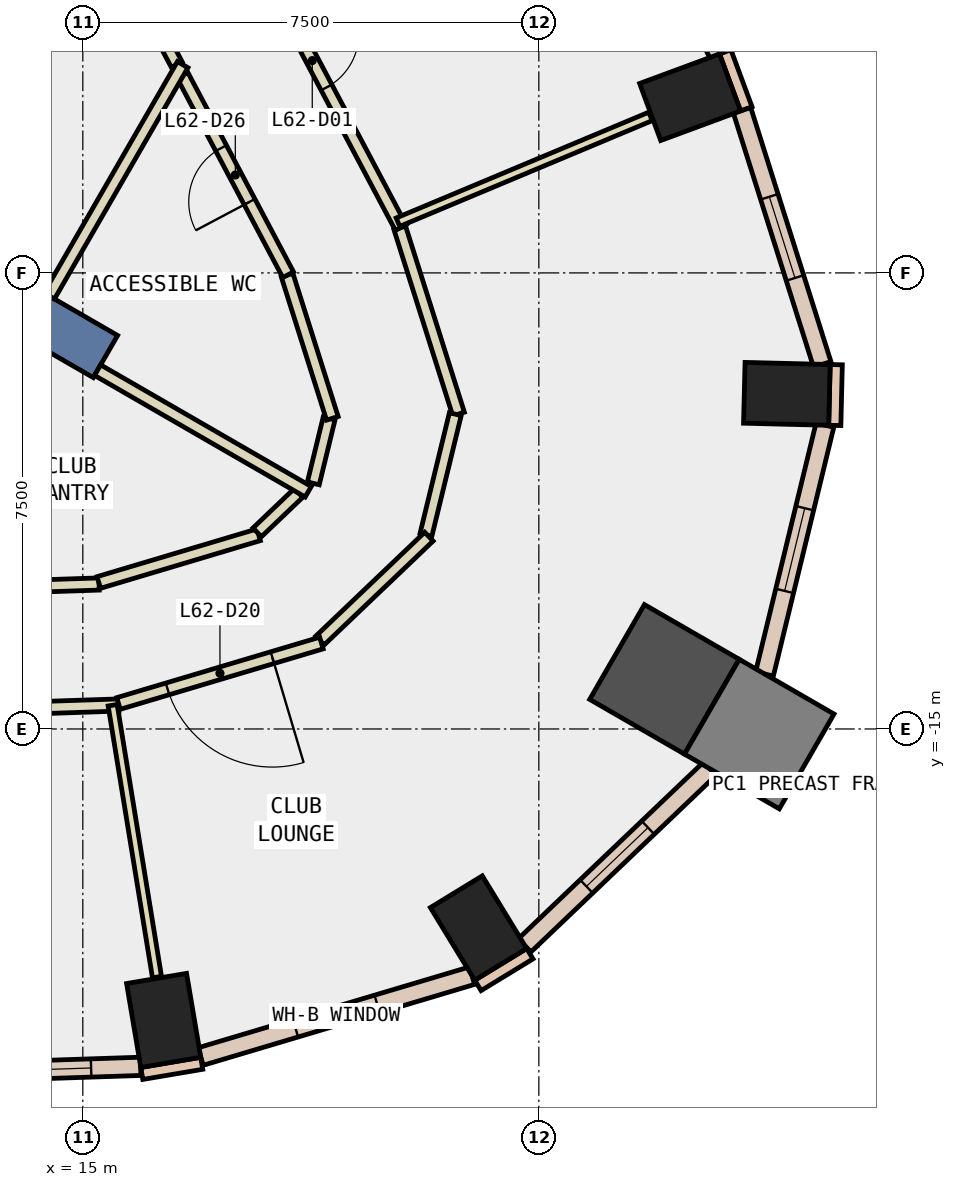
"""IFC4 building model, lengths in metres.
Left out: names, types, materials, properties, quantities, classifications, styles, units other than length and angle.
Written with IfcOpenShell. Run it as: python <this file> out.ifc"""

import sys

from ifc_helpers import new_model, si_unit, direction, frame, frame_2d, origin, origin_2d, place, context, subcontext, project, spatial, rectangle, extrude, element, fill, save


model = new_model("IFC4")
c1 = context("Model", 3, precision=1e-05, world=origin(), true_north=direction((0.0, 1.0)))
c2 = subcontext(c1, "Body", "Model", "MODEL_VIEW")
j1 = project(units=[si_unit("LENGTHUNIT", "METRE"), si_unit("PLANEANGLEUNIT", "RADIAN")], contexts=[c1])
p1 = place(None, origin())
s1 = spatial("IfcSite", under=j1, at=p1, CompositionType="ELEMENT")
p2 = place(p1, origin())
s2 = spatial("IfcBuilding", under=s1, at=p2, CompositionType="ELEMENT")
p3 = place(p2, frame((0.0, 0.0, 270.2)))
s3 = spatial("IfcBuildingStorey", under=s2, at=p3, CompositionType="ELEMENT", Elevation=270.2)
for number, where, z_axis, x_axis in (
    (1, (16.33, -19.793, -0.34), (0.0, 0.0, 1.0), (0.986, 0.167, 0.0)),
    (2, (21.508, -18.274, -0.34), (0.0, 0.0, 1.0), (0.853, 0.521, 0.0)),
):
    element("IfcColumn", number, at=place(p3, frame(where, z_axis=z_axis, x_axis=x_axis)), inside=s3, PredefinedType="COLUMN", context=c2, shape_type="SweptSolid", body=[
        extrude(rectangle(XDim=1.0, YDim=1.4, at=origin_2d()), origin(), (0.0, 0.0, 1.0), 3.6),
    ])
p4 = place(p3, frame((24.566, -14.184, -0.34), z_axis=(0.0, 0.0, 1.0), x_axis=(-0.866025403784, 0.5, 0.0)))
e3 = element("IfcColumn", 3, at=p4, inside=s3, PredefinedType="COLUMN", context=c2, shape_type="SweptSolid", body=[
    extrude(rectangle(XDim=1.8, YDim=1.8, at=origin_2d()), origin(), (0.0, 0.0, 1.0), 3.6),
])
for number, where, z_axis, x_axis in (
    (4, (26.579, -9.489, -0.34), (0.0, 0.0, 1.0), (0.025, 1.0, 0.0)),
    (5, (24.988, -4.611, -0.34), (0.0, 0.0, 1.0), (-0.347, 0.938, 0.0)),
):
    element("IfcColumn", number, at=place(p3, frame(where, z_axis=z_axis, x_axis=x_axis)), inside=s3, PredefinedType="COLUMN", context=c2, shape_type="SweptSolid", body=[
        extrude(rectangle(XDim=1.0, YDim=1.4, at=origin_2d()), origin(), (0.0, 0.0, 1.0), 3.6),
    ])
p5 = place(p3, frame((26.125, -15.084, -0.34), z_axis=(0.0, 0.0, 1.0), x_axis=(-0.866025403784, 0.5, 0.0)))
e6 = element("IfcColumn", 6, at=p5, inside=s3, PredefinedType="COLUMN", context=c2, shape_type="SweptSolid", body=[
    extrude(rectangle(XDim=1.8, YDim=1.8, at=origin_2d()), origin(), (0.0, 0.0, 1.0), 3.6),
])
p6 = place(p3, frame((7.578, -4.375, -0.34), z_axis=(0.0, 0.0, 1.0), x_axis=(0.866024315419, -0.5000018851, 0.0)))
e7 = element("IfcWall", 7, at=p6, inside=s3, PredefinedType="SHEAR", context=c2, shape_type="SweptSolid", body=[
    extrude(rectangle(XDim=9.0, YDim=0.8, at=frame_2d((4.5, 0.0))), origin(), (0.0, 0.0, 1.0), 3.6),
])
for number, where, z_axis, x_axis in (
    (8, (25.912, -4.803, 0.0), (0.0, 0.0, 1.0), (-0.347, 0.938, 0.0)),
    (9, (15.97, -20.665, 0.0), (0.0, 0.0, 1.0), (0.986, 0.167, 0.0)),
):
    element("IfcWall", number, at=place(p3, frame(where, z_axis=z_axis, x_axis=x_axis)), inside=s3, PredefinedType="STANDARD", context=c2, shape_type="SweptSolid", body=[
        extrude(rectangle(XDim=1.0, YDim=0.2, at=frame_2d((0.5, 0.0))), origin(), (0.0, 0.0, 1.0), 3.26),
    ])
p7 = place(p3, frame((21.498, -19.217, 0.0), z_axis=(0.0, 0.0, 1.0), x_axis=(0.853679739553, 0.520798331677, 0.0)))
e10 = element("IfcWall", 10, at=p7, inside=s3, PredefinedType="STANDARD", context=c2, shape_type="SweptSolid", body=[
    extrude(rectangle(XDim=1.0, YDim=0.2, at=frame_2d((0.5, 0.0))), origin(), (0.0, 0.0, 1.0), 3.26),
])
p8 = place(p3, frame((27.367, -10.008, 0.0), z_axis=(0.0, 0.0, 1.0), x_axis=(0.024186470916, 0.999707464524, 0.0)))
e11 = element("IfcWall", 11, at=p8, inside=s3, PredefinedType="STANDARD", context=c2, shape_type="SweptSolid", body=[
    extrude(rectangle(XDim=0.999, YDim=0.2, at=frame_2d((0.5, 0.0))), origin(), (0.0, 0.0, 1.0), 3.26),
])
p9 = place(p3, frame((8.296, -20.802, 0.0), z_axis=(0.0, 0.0, 1.0), x_axis=(0.999450376985, 0.033150323459, 0.0)))
e12 = element("IfcWall", 12, at=p9, inside=s3, PredefinedType="STANDARD", context=c2, shape_type="SweptSolid", body=[
    extrude(rectangle(XDim=7.659, YDim=0.3, at=frame_2d((3.83, 0.0))), origin(), (0.0, 0.0, 1.0), 3.26),
])
p10 = place(p9, frame((0.815, 0.0, 0.9)))
e13 = element("IfcOpeningElement", 13, at=p10, cuts=e12, PredefinedType="OPENING", context=c2, shape_type="SweptSolid", body=[
    extrude(rectangle(XDim=2.2, YDim=2.0, at=frame_2d((1.1, 1.0))), frame((0.0, 0.16, 0.0), z_axis=(0.0, -1.0, 0.0), x_axis=(1.0, 0.0, 0.0)), (0.0, 0.0, 1.0), 0.32),
])
p11 = place(p9, frame((4.644, 0.0, 0.9)))
e14 = element("IfcOpeningElement", 14, at=p11, cuts=e12, PredefinedType="OPENING", context=c2, shape_type="SweptSolid", body=[
    extrude(rectangle(XDim=2.2, YDim=2.0, at=frame_2d((1.1, 1.0))), frame((0.0, 0.16, 0.0), z_axis=(0.0, -1.0, 0.0), x_axis=(1.0, 0.0, 0.0)), (0.0, 0.0, 1.0), 0.32),
])
p12 = place(p3, frame((16.937, -20.387, 0.0), z_axis=(0.0, 0.0, 1.0), x_axis=(0.958361270465, 0.285558532131, 0.0)))
e15 = element("IfcWall", 15, at=p12, inside=s3, PredefinedType="STANDARD", context=c2, shape_type="SweptSolid", body=[
    extrude(rectangle(XDim=4.658, YDim=0.3, at=frame_2d((2.329, 0.0))), origin(), (0.0, 0.0, 1.0), 3.26),
])
p13 = place(p12, frame((1.629, 0.0, 0.9)))
e16 = element("IfcOpeningElement", 16, at=p13, cuts=e15, PredefinedType="OPENING", context=c2, shape_type="SweptSolid", body=[
    extrude(rectangle(XDim=1.4, YDim=2.0, at=frame_2d((0.7, 1.0))), frame((0.0, 0.16, 0.0), z_axis=(0.0, -1.0, 0.0), x_axis=(1.0, 0.0, 0.0)), (0.0, 0.0, 1.0), 0.32),
])
p14 = place(p3, frame((22.266, -18.559, 0.0), z_axis=(0.0, 0.0, 1.0), x_axis=(0.723526681061, 0.690296415892, 0.0)))
e17 = element("IfcWall", 17, at=p14, inside=s3, PredefinedType="STANDARD", context=c2, shape_type="SweptSolid", body=[
    extrude(rectangle(XDim=4.21, YDim=0.3, at=frame_2d((2.105, 0.0))), origin(), (0.0, 0.0, 1.0), 3.26),
])
p15 = place(p14, frame((1.405, 0.0, 0.9)))
e18 = element("IfcOpeningElement", 18, at=p15, cuts=e17, PredefinedType="OPENING", context=c2, shape_type="SweptSolid", body=[
    extrude(rectangle(XDim=1.4, YDim=2.0, at=frame_2d((0.7, 1.0))), frame((0.0, 0.16, 0.0), z_axis=(0.0, -1.0, 0.0), x_axis=(1.0, 0.0, 0.0)), (0.0, 0.0, 1.0), 0.32),
])
p16 = place(p3, frame((26.211, -14.095, 0.0), z_axis=(0.0, 0.0, 1.0), x_axis=(0.236077883519, 0.97173413695, 0.0)))
e19 = element("IfcWall", 19, at=p16, inside=s3, PredefinedType="STANDARD", context=c2, shape_type="SweptSolid", body=[
    extrude(rectangle(XDim=4.211, YDim=0.3, at=frame_2d((2.105, 0.0))), origin(), (0.0, 0.0, 1.0), 3.26),
])
p17 = place(p16, frame((1.405, 0.0, 0.9)))
e20 = element("IfcOpeningElement", 20, at=p17, cuts=e19, PredefinedType="OPENING", context=c2, shape_type="SweptSolid", body=[
    extrude(rectangle(XDim=1.4, YDim=2.0, at=frame_2d((0.7, 1.0))), frame((0.0, 0.16, 0.0), z_axis=(0.0, -1.0, 0.0), x_axis=(1.0, 0.0, 0.0)), (0.0, 0.0, 1.0), 0.32),
])
p18 = place(p3, frame((27.161, -9.004, 0.0), z_axis=(0.0, 0.0, 1.0), x_axis=(-0.30108868778, 0.953596142028, 0.0)))
e21 = element("IfcWall", 21, at=p18, inside=s3, PredefinedType="STANDARD", context=c2, shape_type="SweptSolid", body=[
    extrude(rectangle(XDim=4.38, YDim=0.3, at=frame_2d((2.19, 0.0))), origin(), (0.0, 0.0, 1.0), 3.26),
])
p19 = place(p18, frame((1.49, 0.0, 0.9)))
e22 = element("IfcOpeningElement", 22, at=p19, cuts=e21, PredefinedType="OPENING", context=c2, shape_type="SweptSolid", body=[
    extrude(rectangle(XDim=1.4, YDim=2.0, at=frame_2d((0.7, 1.0))), frame((0.0, 0.16, 0.0), z_axis=(0.0, -1.0, 0.0), x_axis=(1.0, 0.0, 0.0)), (0.0, 0.0, 1.0), 0.32),
])
p20 = place(p3, frame((25.454, -3.907, 0.0), z_axis=(0.0, 0.0, 1.0), x_axis=(-0.468220106253, 0.883611867338, 0.0)))
e23 = element("IfcWall", 23, at=p20, inside=s3, PredefinedType="STANDARD", context=c2, shape_type="SweptSolid", body=[
    extrude(rectangle(XDim=5.703, YDim=0.3, at=frame_2d((2.852, 0.0))), origin(), (0.0, 0.0, 1.0), 3.26),
])
p21 = place(p20, frame((0.476, 0.0, 0.9)))
e24 = element("IfcOpeningElement", 24, at=p21, cuts=e23, PredefinedType="OPENING", context=c2, shape_type="SweptSolid", body=[
    extrude(rectangle(XDim=1.9, YDim=2.0, at=frame_2d((0.95, 1.0))), frame((0.0, 0.16, 0.0), z_axis=(0.0, -1.0, 0.0), x_axis=(1.0, 0.0, 0.0)), (0.0, 0.0, 1.0), 0.32),
])
p22 = place(p20, frame((3.327, 0.0, 0.9)))
e25 = element("IfcOpeningElement", 25, at=p22, cuts=e23, PredefinedType="OPENING", context=c2, shape_type="SweptSolid", body=[
    extrude(rectangle(XDim=1.9, YDim=2.0, at=frame_2d((0.95, 1.0))), frame((0.0, 0.16, 0.0), z_axis=(0.0, -1.0, 0.0), x_axis=(1.0, 0.0, 0.0)), (0.0, 0.0, 1.0), 0.32),
])
p23 = place(p3, frame((16.545, -4.074, 0.0), z_axis=(0.0, 0.0, 1.0), x_axis=(-0.468321873419, 0.883557934081, 0.0)))
e26 = element("IfcWall", 26, at=p23, inside=s3, PredefinedType="PARTITIONING", context=c2, shape_type="SweptSolid", body=[
    extrude(rectangle(XDim=2.093, YDim=0.2, at=frame_2d((1.046, 0.0))), origin(), (0.0, 0.0, 1.0), 3.26),
])
p24 = place(p3, frame((11.716, -12.734, 0.0), z_axis=(0.0, 0.0, 1.0), x_axis=(0.999449093602, 0.03318899362, 0.0)))
e27 = element("IfcWall", 27, at=p24, inside=s3, PredefinedType="PARTITIONING", context=c2, shape_type="SweptSolid", body=[
    extrude(rectangle(XDim=3.553, YDim=0.2, at=frame_2d((1.776, 0.0))), origin(), (0.0, 0.0, 1.0), 3.26),
])
p25 = place(p24, frame((1.276, 0.0, 0.0)))
e28 = element("IfcOpeningElement", 28, at=p25, cuts=e27, PredefinedType="OPENING", context=c2, shape_type="SweptSolid", body=[
    extrude(rectangle(XDim=1.0, YDim=2.1, at=frame_2d((0.5, 1.05))), frame((0.0, 0.11, 0.0), z_axis=(0.0, -1.0, 0.0), x_axis=(1.0, 0.0, 0.0)), (0.0, 0.0, 1.0), 0.22),
])
p26 = place(p3, frame((15.263, -12.591, 0.0), z_axis=(0.0, 0.0, 1.0), x_axis=(0.958253964342, 0.285918414628, 0.0)))
e29 = element("IfcWall", 29, at=p26, inside=s3, PredefinedType="PARTITIONING", context=c2, shape_type="SweptSolid", body=[
    extrude(rectangle(XDim=2.743, YDim=0.2, at=frame_2d((1.371, 0.0))), origin(), (0.0, 0.0, 1.0), 3.26),
])
p27 = place(p3, frame((17.868, -11.767, 0.0), z_axis=(0.0, 0.0, 1.0), x_axis=(0.723402701671, 0.690426340181, 0.0)))
e30 = element("IfcWall", 30, at=p27, inside=s3, PredefinedType="PARTITIONING", context=c2, shape_type="SweptSolid", body=[
    extrude(rectangle(XDim=0.94, YDim=0.2, at=frame_2d((0.47, 0.0))), origin(), (0.0, 0.0, 1.0), 3.26),
])
p28 = place(p3, frame((18.791, -10.961, 0.0), z_axis=(0.0, 0.0, 1.0), x_axis=(0.236572634589, 0.971613806285, 0.0)))
e31 = element("IfcWall", 31, at=p28, inside=s3, PredefinedType="PARTITIONING", context=c2, shape_type="SweptSolid", body=[
    extrude(rectangle(XDim=1.099, YDim=0.2, at=frame_2d((0.55, 0.0))), origin(), (0.0, 0.0, 1.0), 3.26),
])
p29 = place(p3, frame((19.104, -9.891, 0.0), z_axis=(0.0, 0.0, 1.0), x_axis=(-0.301325410186, 0.953521366922, 0.0)))
e32 = element("IfcWall", 32, at=p29, inside=s3, PredefinedType="PARTITIONING", context=c2, shape_type="SweptSolid", body=[
    extrude(rectangle(XDim=2.469, YDim=0.2, at=frame_2d((1.234, 0.0))), origin(), (0.0, 0.0, 1.0), 3.26),
])
p30 = place(p3, frame((18.377, -7.53, 0.0), z_axis=(0.0, 0.0, 1.0), x_axis=(-0.468214048123, 0.883615077474, 0.0)))
e33 = element("IfcWall", 33, at=p30, inside=s3, PredefinedType="PARTITIONING", context=c2, shape_type="SweptSolid", body=[
    extrude(rectangle(XDim=3.712, YDim=0.2, at=frame_2d((1.856, 0.0))), origin(), (0.0, 0.0, 1.0), 3.26),
])
p31 = place(p30, frame((1.356, 0.0, 0.0)))
e34 = element("IfcOpeningElement", 34, at=p31, cuts=e33, PredefinedType="OPENING", context=c2, shape_type="SweptSolid", body=[
    extrude(rectangle(XDim=1.0, YDim=2.1, at=frame_2d((0.5, 1.05))), frame((0.0, 0.11, 0.0), z_axis=(0.0, -1.0, 0.0), x_axis=(1.0, 0.0, 0.0)), (0.0, 0.0, 1.0), 0.22),
])
p32 = place(p3, frame((15.591, -14.606, 0.0), z_axis=(0.0, 0.0, 1.0), x_axis=(-0.999445318732, -0.03330247535, 0.0)))
e35 = element("IfcWall", 35, at=p32, inside=s3, PredefinedType="PARTITIONING", context=c2, shape_type="SweptSolid", body=[
    extrude(rectangle(XDim=7.896, YDim=0.2, at=frame_2d((3.948, 0.0))), origin(), (0.0, 0.0, 1.0), 3.26),
])
p33 = place(p32, frame((3.498, 0.0, 0.0)))
e36 = element("IfcOpeningElement", 36, at=p33, cuts=e35, PredefinedType="OPENING", context=c2, shape_type="SweptSolid", body=[
    extrude(rectangle(XDim=0.9, YDim=2.1, at=frame_2d((0.45, 1.05))), frame((0.0, 0.11, 0.0), z_axis=(0.0, -1.0, 0.0), x_axis=(1.0, 0.0, 0.0)), (0.0, 0.0, 1.0), 0.22),
])
p34 = place(p3, frame((20.213, -6.761, 0.0), z_axis=(0.0, 0.0, 1.0), x_axis=(0.301331608119, -0.953519408271, 0.0)))
e37 = element("IfcWall", 37, at=p34, inside=s3, PredefinedType="PARTITIONING", context=c2, shape_type="SweptSolid", body=[
    extrude(rectangle(XDim=3.209, YDim=0.2, at=frame_2d((1.604, 0.0))), origin(), (0.0, 0.0, 1.0), 3.26),
])
p35 = place(p3, frame((21.126, -9.823, 0.0), z_axis=(0.0, 0.0, 1.0), x_axis=(-0.236372924437, -0.971662410816, 0.0)))
e38 = element("IfcWall", 38, at=p35, inside=s3, PredefinedType="PARTITIONING", context=c2, shape_type="SweptSolid", body=[
    extrude(rectangle(XDim=2.043, YDim=0.2, at=frame_2d((1.021, 0.0))), origin(), (0.0, 0.0, 1.0), 3.26),
])
p36 = place(p3, frame((20.692, -11.837, 0.0), z_axis=(0.0, 0.0, 1.0), x_axis=(-0.723668833869, -0.690147389248, 0.0)))
e39 = element("IfcWall", 39, at=p36, inside=s3, PredefinedType="PARTITIONING", context=c2, shape_type="SweptSolid", body=[
    extrude(rectangle(XDim=2.476, YDim=0.2, at=frame_2d((1.238, 0.0))), origin(), (0.0, 0.0, 1.0), 3.26),
])
p37 = place(p3, frame((18.924, -13.587, 0.0), z_axis=(0.0, 0.0, 1.0), x_axis=(-0.958378336681, -0.285501250052, 0.0)))
e40 = element("IfcWall", 40, at=p37, inside=s3, PredefinedType="PARTITIONING", context=c2, shape_type="SweptSolid", body=[
    extrude(rectangle(XDim=3.482, YDim=0.2, at=frame_2d((1.741, 0.0))), origin(), (0.0, 0.0, 1.0), 3.26),
])
p38 = place(p37, frame((0.841, 0.0, 0.0)))
e41 = element("IfcOpeningElement", 41, at=p38, cuts=e40, PredefinedType="OPENING", context=c2, shape_type="SweptSolid", body=[
    extrude(rectangle(XDim=1.8, YDim=2.1, at=frame_2d((0.9, 1.05))), frame((0.0, 0.11, 0.0), z_axis=(0.0, -1.0, 0.0), x_axis=(1.0, 0.0, 0.0)), (0.0, 0.0, 1.0), 0.22),
])
p39 = place(p3, frame((17.318, -1.262, 0.0), z_axis=(0.0, 0.0, 1.0), x_axis=(0.468313568794, -0.883562335822, 0.0)))
e42 = element("IfcWall", 42, at=p39, inside=s3, PredefinedType="PARTITIONING", context=c2, shape_type="SweptSolid", body=[
    extrude(rectangle(XDim=6.216, YDim=0.2, at=frame_2d((3.108, 0.0))), origin(), (0.0, 0.0, 1.0), 3.26),
])
p40 = place(p39, frame((2.608, 0.0, 0.0)))
e43 = element("IfcOpeningElement", 43, at=p40, cuts=e42, PredefinedType="OPENING", context=c2, shape_type="SweptSolid", body=[
    extrude(rectangle(XDim=1.0, YDim=2.1, at=frame_2d((0.5, 1.05))), frame((0.0, 0.11, 0.0), z_axis=(0.0, -1.0, 0.0), x_axis=(1.0, 0.0, 0.0)), (0.0, 0.0, 1.0), 0.22),
])
p41 = place(p3, frame((16.642, -4.075, 0.0), z_axis=(0.0, 0.0, 1.0), x_axis=(-0.49980426207, -0.866138383641, 0.0)))
e44 = element("IfcWall", 44, at=p41, inside=s3, PredefinedType="PARTITIONING", context=c2, shape_type="SweptSolid", body=[
    extrude(rectangle(XDim=4.392, YDim=0.2, at=frame_2d((2.196, 0.0))), origin(), (0.0, 0.0, 1.0), 3.26),
])
p42 = place(p3, frame((15.243, -9.099, 0.0), z_axis=(0.0, 0.0, 1.0), x_axis=(0.866026010844, -0.49999894854, 0.0)))
e45 = element("IfcWall", 45, at=p42, inside=s3, PredefinedType="PARTITIONING", context=c2, shape_type="SweptSolid", body=[
    extrude(rectangle(XDim=4.0, YDim=0.2, at=frame_2d((2.0, 0.0))), origin(), (0.0, 0.0, 1.0), 3.26),
])
p43 = place(p3, frame((15.491, -14.61, 0.0), z_axis=(0.0, 0.0, 1.0), x_axis=(0.160928343418, -0.986966092774, 0.0)))
e46 = element("IfcWall", 46, at=p43, inside=s3, PredefinedType="PARTITIONING", context=c2, shape_type="SweptSolid", body=[
    extrude(rectangle(XDim=4.53, YDim=0.15, at=frame_2d((2.265, 0.0))), origin(), (0.0, 0.0, 1.0), 3.26),
])
p44 = place(p3, frame((20.183, -6.666, 0.0), z_axis=(0.0, 0.0, 1.0), x_axis=(0.922347108299, 0.386362280525, 0.0)))
e47 = element("IfcWall", 47, at=p44, inside=s3, PredefinedType="PARTITIONING", context=c2, shape_type="SweptSolid", body=[
    extrude(rectangle(XDim=4.503, YDim=0.15, at=frame_2d((2.252, 0.0))), origin(), (0.0, 0.0, 1.0), 3.26),
])
p45 = place(p11, origin())
e48 = element("IfcWindow", 48, at=p45, inside=s3, PartitioningType="SINGLE_PANEL", PredefinedType="WINDOW", context=c2, shape_type="SweptSolid", body=[
    extrude(rectangle(XDim=2.2, YDim=2.0, at=frame_2d((1.1, 1.0))), frame((0.0, 0.03, 0.0), z_axis=(0.0, -1.0, 0.0), x_axis=(1.0, 0.0, 0.0)), (0.0, 0.0, 1.0), 0.06),
])
fill(e14, e48)
p46 = place(p13, origin())
e49 = element("IfcWindow", 49, at=p46, inside=s3, PartitioningType="SINGLE_PANEL", PredefinedType="WINDOW", context=c2, shape_type="SweptSolid", body=[
    extrude(rectangle(XDim=1.4, YDim=2.0, at=frame_2d((0.7, 1.0))), frame((0.0, 0.03, 0.0), z_axis=(0.0, -1.0, 0.0), x_axis=(1.0, 0.0, 0.0)), (0.0, 0.0, 1.0), 0.06),
])
fill(e16, e49)
p47 = place(p15, origin())
e50 = element("IfcWindow", 50, at=p47, inside=s3, PartitioningType="SINGLE_PANEL", PredefinedType="WINDOW", context=c2, shape_type="SweptSolid", body=[
    extrude(rectangle(XDim=1.4, YDim=2.0, at=frame_2d((0.7, 1.0))), frame((0.0, 0.03, 0.0), z_axis=(0.0, -1.0, 0.0), x_axis=(1.0, 0.0, 0.0)), (0.0, 0.0, 1.0), 0.06),
])
fill(e18, e50)
p48 = place(p17, origin())
e51 = element("IfcWindow", 51, at=p48, inside=s3, PartitioningType="SINGLE_PANEL", PredefinedType="WINDOW", context=c2, shape_type="SweptSolid", body=[
    extrude(rectangle(XDim=1.4, YDim=2.0, at=frame_2d((0.7, 1.0))), frame((0.0, 0.03, 0.0), z_axis=(0.0, -1.0, 0.0), x_axis=(1.0, 0.0, 0.0)), (0.0, 0.0, 1.0), 0.06),
])
fill(e20, e51)
p49 = place(p19, origin())
e52 = element("IfcWindow", 52, at=p49, inside=s3, PartitioningType="SINGLE_PANEL", PredefinedType="WINDOW", context=c2, shape_type="SweptSolid", body=[
    extrude(rectangle(XDim=1.4, YDim=2.0, at=frame_2d((0.7, 1.0))), frame((0.0, 0.03, 0.0), z_axis=(0.0, -1.0, 0.0), x_axis=(1.0, 0.0, 0.0)), (0.0, 0.0, 1.0), 0.06),
])
fill(e22, e52)
p50 = place(p40, origin())
e53 = element("IfcDoor", 53, at=p50, inside=s3, OperationType="SINGLE_SWING_LEFT", PredefinedType="DOOR", context=c2, shape_type="SweptSolid", body=[
    extrude(rectangle(XDim=1.0, YDim=2.1, at=frame_2d((0.5, 1.05))), frame((0.0, 0.025, 0.0), z_axis=(0.0, -1.0, 0.0), x_axis=(1.0, 0.0, 0.0)), (0.0, 0.0, 1.0), 0.05),
])
fill(e43, e53)
p51 = place(p38, origin())
e54 = element("IfcDoor", 54, at=p51, inside=s3, OperationType="DOUBLE_DOOR_SINGLE_SWING", PredefinedType="DOOR", context=c2, shape_type="SweptSolid", body=[
    extrude(rectangle(XDim=1.8, YDim=2.1, at=frame_2d((0.9, 1.05))), frame((0.0, 0.025, 0.0), z_axis=(0.0, -1.0, 0.0), x_axis=(1.0, 0.0, 0.0)), (0.0, 0.0, 1.0), 0.05),
])
fill(e41, e54)
p52 = place(p31, origin())
e55 = element("IfcDoor", 55, at=p52, inside=s3, OperationType="SINGLE_SWING_RIGHT", PredefinedType="DOOR", context=c2, shape_type="SweptSolid", body=[
    extrude(rectangle(XDim=1.0, YDim=2.1, at=frame_2d((0.5, 1.05))), frame((0.0, 0.025, 0.0), z_axis=(0.0, -1.0, 0.0), x_axis=(1.0, 0.0, 0.0)), (0.0, 0.0, 1.0), 0.05),
])
fill(e34, e55)
save(model, sys.argv[1])
